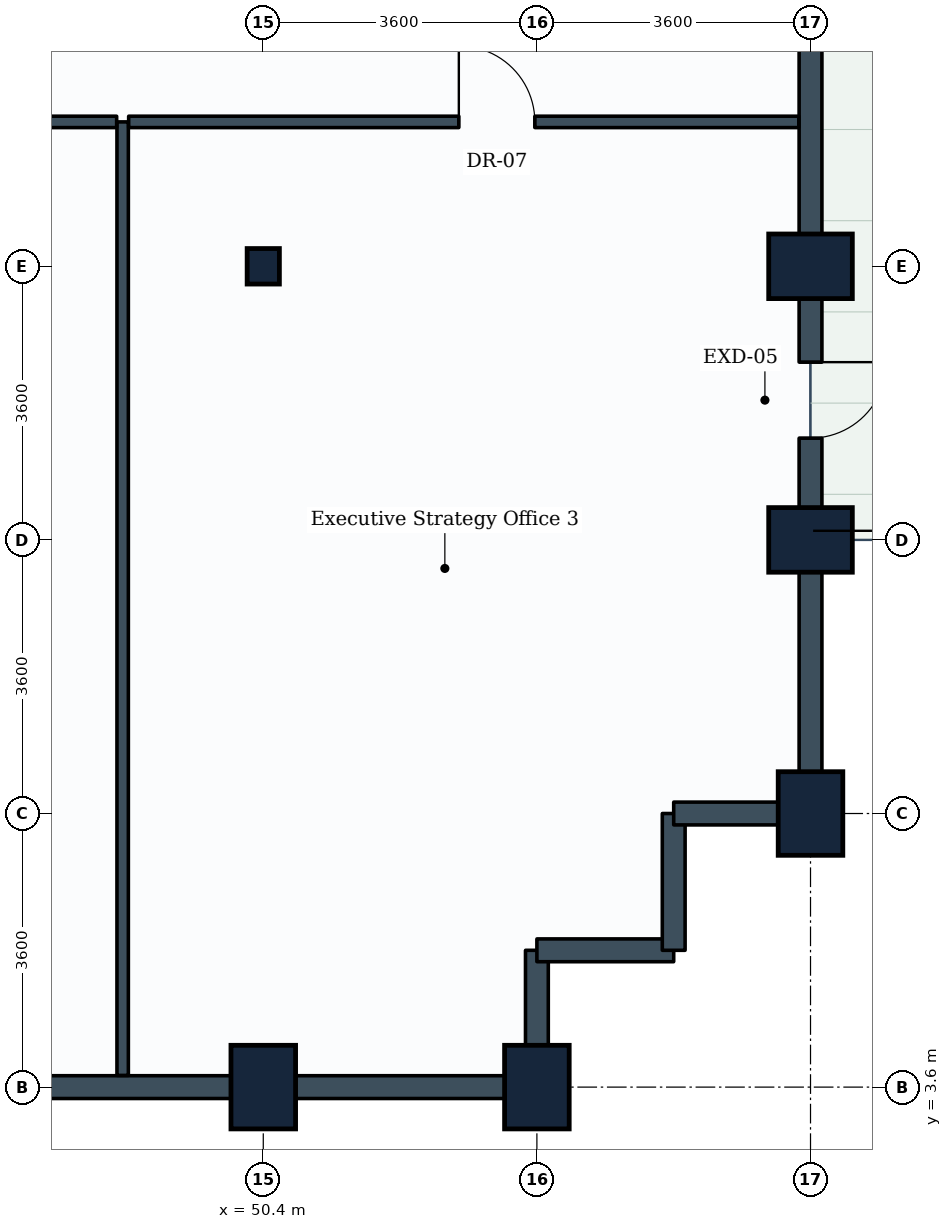
"""IFC4 building model, lengths in metres.
Left out: names, types, materials, properties, quantities, classifications, styles, units other than length and angle.
Written with IfcOpenShell. Run it as: python <this file> out.ifc"""

import sys

from ifc_helpers import new_model, si_unit, direction, frame, frame_2d, origin, origin_2d, place, context, subcontext, project, spatial, rectangle, i_section, extrude, element, fill, save


model = new_model("IFC4")
c1 = context("Model", 3, precision=1e-05, world=origin(), true_north=direction((0.0, 1.0)))
c2 = subcontext(c1, "Body", "Model", "MODEL_VIEW")
j1 = project(units=[si_unit("LENGTHUNIT", "METRE"), si_unit("PLANEANGLEUNIT", "RADIAN")], contexts=[c1])
p1 = place(None, origin())
s1 = spatial("IfcSite", under=j1, at=p1, CompositionType="ELEMENT")
p2 = place(p1, origin())
s2 = spatial("IfcBuilding", under=s1, at=p2, CompositionType="ELEMENT")
p3 = place(p2, frame((0.0, 0.0, 107.4)))
s3 = spatial("IfcBuildingStorey", under=s2, at=p3, CompositionType="ELEMENT", Elevation=107.4)
p4 = place(p3, frame((50.4, 3.6, 0.0), z_axis=(0.0, 0.0, 1.0), x_axis=(1.0, 0.0, 0.0)))
e1 = element("IfcColumn", 1, at=p4, inside=s3, PredefinedType="COLUMN", context=c2, shape_type="SweptSolid", body=[
    extrude(rectangle(XDim=0.85, YDim=1.1, at=origin_2d()), origin(), (0.0, 0.0, 1.0), 3.9),
])
p5 = place(p3, frame((50.4, 14.4, 0.0), z_axis=(0.0, 0.0, 1.0), x_axis=(1.0, 0.0, 0.0)))
e2 = element("IfcColumn", 2, at=p5, inside=s3, PredefinedType="COLUMN", context=c2, shape_type="SweptSolid", body=[
    extrude(i_section(OverallWidth=0.424, OverallDepth=0.467, WebThickness=0.033, FlangeThickness=0.053, FilletRadius=0.015, at=origin_2d()), origin(), (0.0, 0.0, 1.0), 3.9),
])
for number, where, z_axis, x_axis in (
    (3, (54.0, 3.6, 0.0), (0.0, 0.0, 1.0), (1.0, 0.0, 0.0)),
    (4, (57.6, 7.2, 0.0), (0.0, 0.0, 1.0), (1.0, 0.0, 0.0)),
    (5, (57.6, 10.8, 0.0), (0.0, 0.0, 1.0), (0.0, 1.0, 0.0)),
    (6, (57.6, 14.4, 0.0), (0.0, 0.0, 1.0), (0.0, 1.0, 0.0)),
):
    element("IfcColumn", number, at=place(p3, frame(where, z_axis=z_axis, x_axis=x_axis)), inside=s3, PredefinedType="COLUMN", context=c2, shape_type="SweptSolid", body=[
        extrude(rectangle(XDim=0.85, YDim=1.1, at=origin_2d()), origin(), (0.0, 0.0, 1.0), 3.9),
    ])
p6 = place(p3, frame((50.4, 3.6, 0.0), z_axis=(0.0, 0.0, 1.0), x_axis=(-1.0, 0.0, 0.0)))
e7 = element("IfcWall", 7, at=p6, inside=s3, PredefinedType="STANDARD", context=c2, shape_type="SweptSolid", body=[
    extrude(rectangle(XDim=3.6, YDim=0.3, at=frame_2d((1.8, 0.0))), origin(), (0.0, 0.0, 1.0), 2.93),
])
p7 = place(p3, frame((54.0, 3.6, 0.0), z_axis=(0.0, 0.0, 1.0), x_axis=(-1.0, 0.0, 0.0)))
e8 = element("IfcWall", 8, at=p7, inside=s3, PredefinedType="STANDARD", context=c2, shape_type="SweptSolid", body=[
    extrude(rectangle(XDim=3.6, YDim=0.3, at=frame_2d((1.8, 0.0))), origin(), (0.0, 0.0, 1.0), 2.93),
])
p8 = place(p3, frame((54.0, 5.4, 0.0), z_axis=(0.0, 0.0, 1.0), x_axis=(0.0, -1.0, 0.0)))
e9 = element("IfcWall", 9, at=p8, inside=s3, PredefinedType="STANDARD", context=c2, shape_type="SweptSolid", body=[
    extrude(rectangle(XDim=1.8, YDim=0.3, at=frame_2d((0.9, 0.0))), origin(), (0.0, 0.0, 1.0), 2.93),
])
for number, where, z_axis, x_axis in (
    (10, (55.8, 5.4, 0.0), (0.0, 0.0, 1.0), (-1.0, 0.0, 0.0)),
    (11, (55.8, 7.2, 0.0), (0.0, 0.0, 1.0), (0.0, -1.0, 0.0)),
):
    element("IfcWall", number, at=place(p3, frame(where, z_axis=z_axis, x_axis=x_axis)), inside=s3, PredefinedType="STANDARD", context=c2, shape_type="SweptSolid", body=[
        extrude(rectangle(XDim=1.8, YDim=0.3, at=frame_2d((0.9, 0.0))), origin(), (0.0, 0.0, 1.0), 3.635),
    ])
p9 = place(p3, frame((57.6, 7.2, 0.0), z_axis=(0.0, 0.0, 1.0), x_axis=(-1.0, 0.0, 0.0)))
e12 = element("IfcWall", 12, at=p9, inside=s3, PredefinedType="STANDARD", context=c2, shape_type="SweptSolid", body=[
    extrude(rectangle(XDim=1.8, YDim=0.3, at=frame_2d((0.9, 0.0))), origin(), (0.0, 0.0, 1.0), 2.93),
])
p10 = place(p3, frame((57.6, 10.8, 0.0), z_axis=(0.0, 0.0, 1.0), x_axis=(0.0, -1.0, 0.0)))
e13 = element("IfcWall", 13, at=p10, inside=s3, PredefinedType="STANDARD", context=c2, shape_type="SweptSolid", body=[
    extrude(rectangle(XDim=3.6, YDim=0.3, at=frame_2d((1.8, 0.0))), origin(), (0.0, 0.0, 1.0), 2.93),
])
p11 = place(p3, frame((57.6, 14.4, 0.0), z_axis=(0.0, 0.0, 1.0), x_axis=(0.0, -1.0, 0.0)))
e14 = element("IfcWall", 14, at=p11, inside=s3, PredefinedType="STANDARD", context=c2, shape_type="SweptSolid", body=[
    extrude(rectangle(XDim=3.6, YDim=0.3, at=frame_2d((1.8, 0.0))), origin(), (0.0, 0.0, 1.0), 2.93),
])
p12 = place(p11, frame((1.261, 0.0, 0.0)))
e15 = element("IfcOpeningElement", 15, at=p12, cuts=e14, PredefinedType="OPENING", context=c2, shape_type="SweptSolid", body=[
    extrude(rectangle(XDim=1.0, YDim=2.1, at=frame_2d((0.5, 1.05))), frame((0.0, 0.16, 0.0), z_axis=(0.0, -1.0, 0.0), x_axis=(1.0, 0.0, 0.0)), (0.0, 0.0, 1.0), 0.32),
])
p13 = place(p3, frame((57.6, 18.0, 0.0), z_axis=(0.0, 0.0, 1.0), x_axis=(0.0, -1.0, 0.0)))
e16 = element("IfcWall", 16, at=p13, inside=s3, PredefinedType="STANDARD", context=c2, shape_type="SweptSolid", body=[
    extrude(rectangle(XDim=3.6, YDim=0.3, at=frame_2d((1.8, 0.0))), origin(), (0.0, 0.0, 1.0), 2.93),
])
p14 = place(p3, frame((48.55, 3.754, 0.0), z_axis=(0.0, 0.0, 1.0), x_axis=(0.0, 1.0, 0.0)))
e17 = element("IfcWall", 17, at=p14, inside=s3, PredefinedType="PARTITIONING", context=c2, shape_type="SweptSolid", body=[
    extrude(rectangle(XDim=12.546, YDim=0.15, at=frame_2d((6.273, 0.0))), origin(), (0.0, 0.0, 1.0), 2.93),
])
p15 = place(p3, frame((41.429, 16.3, 0.0), z_axis=(0.0, 0.0, 1.0), x_axis=(1.0, 0.0, 0.0)))
e18 = element("IfcWall", 18, at=p15, inside=s3, PredefinedType="PARTITIONING", context=c2, shape_type="SweptSolid", body=[
    extrude(rectangle(XDim=7.042, YDim=0.15, at=frame_2d((3.521, 0.0))), origin(), (0.0, 0.0, 1.0), 3.19),
])
p16 = place(p15, frame((4.331, 0.0, 0.0)))
e19 = element("IfcOpeningElement", 19, at=p16, cuts=e18, PredefinedType="OPENING", context=c2, shape_type="SweptSolid", body=[
    extrude(rectangle(XDim=1.0, YDim=2.1, at=frame_2d((0.5, 1.05))), frame((0.0, 0.085, 0.0), z_axis=(0.0, -1.0, 0.0), x_axis=(1.0, 0.0, 0.0)), (0.0, 0.0, 1.0), 0.17),
])
p17 = place(p3, frame((48.629, 16.3, 0.0), z_axis=(0.0, 0.0, 1.0), x_axis=(1.0, 0.0, 0.0)))
e20 = element("IfcWall", 20, at=p17, inside=s3, PredefinedType="PARTITIONING", context=c2, shape_type="SweptSolid", body=[
    extrude(rectangle(XDim=8.817, YDim=0.15, at=frame_2d((4.409, 0.0))), origin(), (0.0, 0.0, 1.0), 2.93),
])
p18 = place(p17, frame((4.344, 0.0, 0.0)))
e21 = element("IfcOpeningElement", 21, at=p18, cuts=e20, PredefinedType="OPENING", context=c2, shape_type="SweptSolid", body=[
    extrude(rectangle(XDim=1.0, YDim=2.1, at=frame_2d((0.5, 1.05))), frame((0.0, 0.085, 0.0), z_axis=(0.0, -1.0, 0.0), x_axis=(1.0, 0.0, 0.0)), (0.0, 0.0, 1.0), 0.17),
])
p19 = place(p12, origin())
e22 = element("IfcDoor", 22, at=p19, inside=s3, OperationType="SINGLE_SWING_LEFT", PredefinedType="DOOR", context=c2, shape_type="SweptSolid", body=[
    extrude(rectangle(XDim=1.0, YDim=2.1, at=frame_2d((0.5, 1.05))), frame((0.0, 0.025, 0.0), z_axis=(0.0, -1.0, 0.0), x_axis=(1.0, 0.0, 0.0)), (0.0, 0.0, 1.0), 0.05),
])
fill(e15, e22)
p20 = place(p18, origin())
e23 = element("IfcDoor", 23, at=p20, inside=s3, OperationType="SINGLE_SWING_LEFT", PredefinedType="DOOR", context=c2, shape_type="SweptSolid", body=[
    extrude(rectangle(XDim=1.0, YDim=2.1, at=frame_2d((0.5, 1.05))), frame((0.0, 0.025, 0.0), z_axis=(0.0, -1.0, 0.0), x_axis=(1.0, 0.0, 0.0)), (0.0, 0.0, 1.0), 0.05),
])
fill(e21, e23)
save(model, sys.argv[1])
